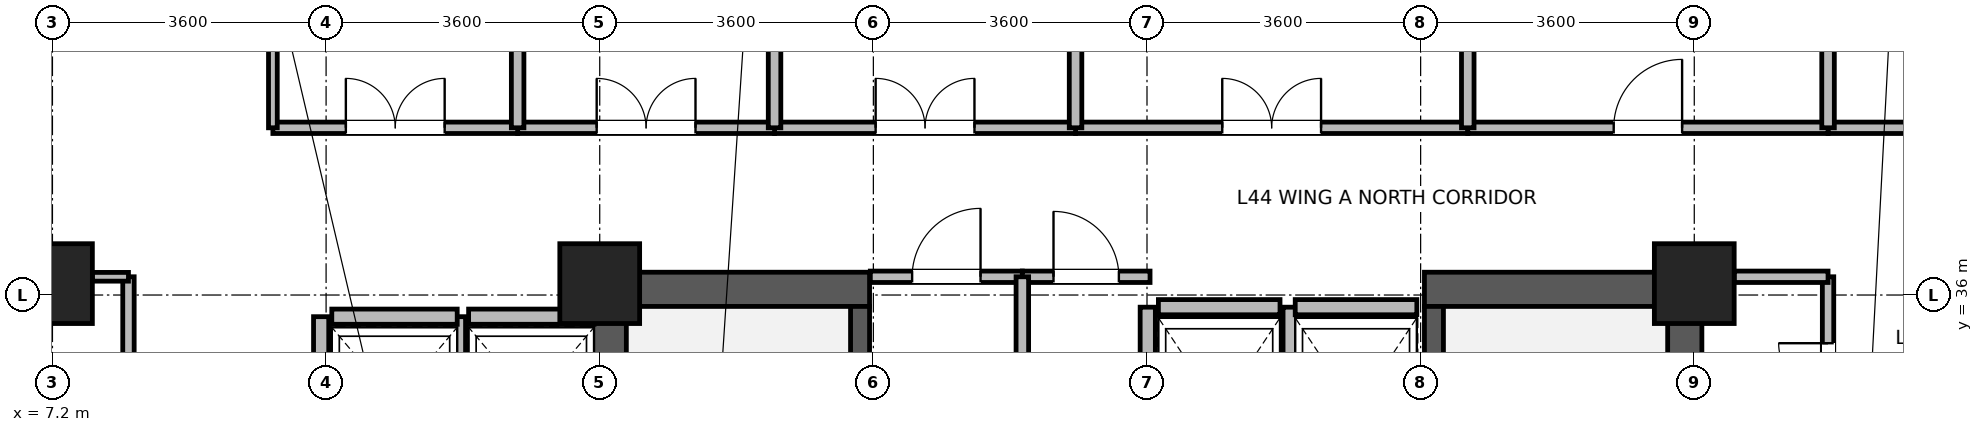
"""IFC4 building model, lengths in metres.
Left out: names, types, materials, properties, quantities, classifications, styles, units other than length and angle.
Written with IfcOpenShell. Run it as: python <this file> out.ifc"""

import sys

from ifc_helpers import new_model, si_unit, direction, frame, frame_2d, origin, origin_2d, place, context, subcontext, project, spatial, rectangle, extrude, source, transform, mapped, element, fill, save


model = new_model("IFC4")
c1 = context("Model", 3, precision=1e-05, world=origin(), true_north=direction((0.0, 1.0)))
c2 = subcontext(c1, "Body", "Model", "MODEL_VIEW")
j1 = project(units=[si_unit("LENGTHUNIT", "METRE"), si_unit("PLANEANGLEUNIT", "RADIAN")], contexts=[c1])
p1 = place(None, origin())
s1 = spatial("IfcSite", under=j1, at=p1, CompositionType="ELEMENT")
p2 = place(p1, origin())
s2 = spatial("IfcBuilding", under=s1, at=p2, CompositionType="ELEMENT")
p3 = place(p2, frame((0.0, 0.0, 173.5)))
s3 = spatial("IfcBuildingStorey", under=s2, at=p3, CompositionType="ELEMENT", Elevation=173.5)
for number, where, z_axis, x_axis in (
    (1, (14.525, 28.4, 0.0), (0.0, 0.0, 1.0), (0.0, 1.0, 0.0)),
    (2, (28.675, 28.4, 0.0), (0.0, 0.0, 1.0), (0.0, 1.0, 0.0)),
):
    element("IfcWall", number, at=place(p3, frame(where, z_axis=z_axis, x_axis=x_axis)), inside=s3, PredefinedType="SHEAR", context=c2, shape_type="SweptSolid", body=[
        extrude(rectangle(XDim=7.9, YDim=0.45, at=frame_2d((3.95, 0.0))), origin(), (0.0, 0.0, 1.0), 3.46),
    ])
for number, where, z_axis, x_axis in (
    (3, (14.75, 36.075, 0.0), (0.0, 0.0, 1.0), (1.0, 0.0, 0.0)),
    (4, (25.25, 36.075, 0.0), (0.0, 0.0, 1.0), (1.0, 0.0, 0.0)),
):
    element("IfcWall", number, at=place(p3, frame(where, z_axis=z_axis, x_axis=x_axis)), inside=s3, PredefinedType="SHEAR", context=c2, shape_type="SweptSolid", body=[
        extrude(rectangle(XDim=3.2, YDim=0.45, at=frame_2d((1.6, 0.0))), origin(), (0.0, 0.0, 1.0), 3.46),
    ])
p4 = place(p3, frame((17.825, 28.85, 0.0), z_axis=(0.0, 0.0, 1.0), x_axis=(0.0, 1.0, 0.0)))
e5 = element("IfcWall", 5, at=p4, inside=s3, PredefinedType="SHEAR", context=c2, shape_type="SweptSolid", body=[
    extrude(rectangle(XDim=7.0, YDim=0.25, at=frame_2d((3.5, 0.0))), origin(), (0.0, 0.0, 1.0), 3.46),
])
p5 = place(p4, frame((0.15, 0.0, 0.0)))
e6 = element("IfcOpeningElement", 6, at=p5, cuts=e5, PredefinedType="OPENING", context=c2, shape_type="SweptSolid", body=[
    extrude(rectangle(XDim=1.1, YDim=2.08, at=frame_2d((0.55, 1.04))), frame((0.0, 0.135, 0.0), z_axis=(0.0, -1.0, 0.0), x_axis=(1.0, 0.0, 0.0)), (0.0, 0.0, 1.0), 0.27),
])
p6 = place(p3, frame((25.375, 28.85, 0.0), z_axis=(0.0, 0.0, 1.0), x_axis=(0.0, 1.0, 0.0)))
e7 = element("IfcWall", 7, at=p6, inside=s3, PredefinedType="SHEAR", context=c2, shape_type="SweptSolid", body=[
    extrude(rectangle(XDim=7.0, YDim=0.25, at=frame_2d((3.5, 0.0))), origin(), (0.0, 0.0, 1.0), 3.46),
])
p7 = place(p6, frame((0.15, 0.0, 0.0)))
e8 = element("IfcOpeningElement", 8, at=p7, cuts=e7, PredefinedType="OPENING", context=c2, shape_type="SweptSolid", body=[
    extrude(rectangle(XDim=1.1, YDim=2.08, at=frame_2d((0.55, 1.04))), frame((0.0, 0.135, 0.0), z_axis=(0.0, -1.0, 0.0), x_axis=(1.0, 0.0, 0.0)), (0.0, 0.0, 1.0), 0.27),
])
m1 = source(origin(), c2, "Body", "SweptSolid", [
    extrude(rectangle(XDim=1.05, YDim=1.05, at=origin_2d()), origin(), (0.0, 0.0, 1.0), 3.7),
])
for number, where, z_axis, x_axis in (
    (9, (7.2, 36.15, 0.0), (0.0, 0.0, 1.0), (1.0, 0.0, 0.0)),
    (10, (14.4, 36.15, 0.0), (0.0, 0.0, 1.0), (1.0, 0.0, 0.0)),
    (11, (28.8, 36.15, 0.0), (0.0, 0.0, 1.0), (1.0, 0.0, 0.0)),
):
    element("IfcColumn", number, at=place(p3, frame(where, z_axis=z_axis, x_axis=x_axis)), inside=s3, PredefinedType="COLUMN", context=c2, shape_type="MappedRepresentation", body=[
        mapped(m1, transform((0.0, 0.0, 0.0), x_axis=(1.0, 0.0, 0.0), y_axis=(0.0, 1.0, 0.0), z_axis=(0.0, 0.0, 1.0), scale=1.0)),
    ])
p8 = place(p3, frame((12.675, 35.715, 0.0), z_axis=(0.0, 0.0, 1.0), x_axis=(1.0, 0.0, 0.0)))
e12 = element("IfcWall", 12, at=p8, inside=s3, PredefinedType="PARTITIONING", context=c2, shape_type="SweptSolid", body=[
    extrude(rectangle(XDim=1.65, YDim=0.2, at=frame_2d((0.825, 0.0))), origin(), (0.0, 0.0, 1.0), 3.44),
])
p9 = place(p3, frame((12.535, 33.485, 0.0), z_axis=(0.0, 0.0, 1.0), x_axis=(0.0, 1.0, 0.0)))
e13 = element("IfcWall", 13, at=p9, inside=s3, PredefinedType="PARTITIONING", context=c2, shape_type="SweptSolid", body=[
    extrude(rectangle(XDim=2.23, YDim=0.2, at=frame_2d((1.115, 0.0))), origin(), (0.0, 0.0, 1.0), 3.44),
])
p10 = place(p3, frame((10.875, 35.715, 0.0), z_axis=(0.0, 0.0, 1.0), x_axis=(1.0, 0.0, 0.0)))
e14 = element("IfcWall", 14, at=p10, inside=s3, PredefinedType="PARTITIONING", context=c2, shape_type="SweptSolid", body=[
    extrude(rectangle(XDim=1.65, YDim=0.2, at=frame_2d((0.825, 0.0))), origin(), (0.0, 0.0, 1.0), 3.44),
])
p11 = place(p3, frame((10.735, 33.485, 0.0), z_axis=(0.0, 0.0, 1.0), x_axis=(0.0, 1.0, 0.0)))
e15 = element("IfcWall", 15, at=p11, inside=s3, PredefinedType="PARTITIONING", context=c2, shape_type="SweptSolid", body=[
    extrude(rectangle(XDim=2.23, YDim=0.2, at=frame_2d((1.115, 0.0))), origin(), (0.0, 0.0, 1.0), 3.44),
])
p12 = place(p3, frame((21.75, 35.84, 0.0), z_axis=(0.0, 0.0, 1.0), x_axis=(1.0, 0.0, 0.0)))
e16 = element("IfcWall", 16, at=p12, inside=s3, PredefinedType="PARTITIONING", context=c2, shape_type="SweptSolid", body=[
    extrude(rectangle(XDim=1.6, YDim=0.2, at=frame_2d((0.8, 0.0))), origin(), (0.0, 0.0, 1.0), 2.44),
])
for number, where, z_axis, x_axis in (
    (17, (21.61, 33.16, 0.0), (0.0, 0.0, 1.0), (0.0, 1.0, 0.0)),
    (18, (23.49, 33.16, 0.0), (0.0, 0.0, 1.0), (0.0, 1.0, 0.0)),
):
    element("IfcWall", number, at=place(p3, frame(where, z_axis=z_axis, x_axis=x_axis)), inside=s3, PredefinedType="PARTITIONING", context=c2, shape_type="SweptSolid", body=[
        extrude(rectangle(XDim=2.68, YDim=0.2, at=frame_2d((1.34, 0.0))), origin(), (0.0, 0.0, 1.0), 3.44),
    ])
p13 = place(p3, frame((23.55, 35.84, 0.0), z_axis=(0.0, 0.0, 1.0), x_axis=(1.0, 0.0, 0.0)))
e19 = element("IfcWall", 19, at=p13, inside=s3, PredefinedType="PARTITIONING", context=c2, shape_type="SweptSolid", body=[
    extrude(rectangle(XDim=1.6, YDim=0.2, at=frame_2d((0.8, 0.0))), origin(), (0.0, 0.0, 1.0), 2.44),
])
p14 = place(p3, frame((20.66, 38.2, 0.0), z_axis=(0.0, 0.0, 1.0), x_axis=(1.0, 0.0, 0.0)))
e20 = element("IfcWall", 20, at=p14, inside=s3, PredefinedType="PARTITIONING", context=c2, shape_type="SweptSolid", body=[
    extrude(rectangle(XDim=5.16, YDim=0.15, at=frame_2d((2.58, 0.0))), origin(), (0.0, 0.0, 1.0), 3.44),
])
p15 = place(p14, frame((1.93, 0.0, 0.0)))
e21 = element("IfcOpeningElement", 21, at=p15, cuts=e20, PredefinedType="OPENING", context=c2, shape_type="SweptSolid", body=[
    extrude(rectangle(XDim=1.3, YDim=2.12, at=frame_2d((0.65, 1.06))), frame((0.0, 0.085, 0.0), z_axis=(0.0, -1.0, 0.0), x_axis=(1.0, 0.0, 0.0)), (0.0, 0.0, 1.0), 0.17),
])
p16 = place(p3, frame((30.56, 38.2, 0.0), z_axis=(0.0, 0.0, 1.0), x_axis=(1.0, 0.0, 0.0)))
e22 = element("IfcWall", 22, at=p16, inside=s3, PredefinedType="PARTITIONING", context=c2, shape_type="SweptSolid", body=[
    extrude(rectangle(XDim=4.8, YDim=0.15, at=frame_2d((2.4, 0.0))), origin(), (0.0, 0.0, 1.0), 3.44),
])
p17 = place(p16, frame((1.75, 0.0, 0.0)))
e23 = element("IfcOpeningElement", 23, at=p17, cuts=e22, PredefinedType="OPENING", context=c2, shape_type="SweptSolid", body=[
    extrude(rectangle(XDim=1.3, YDim=2.12, at=frame_2d((0.65, 1.06))), frame((0.0, 0.085, 0.0), z_axis=(0.0, -1.0, 0.0), x_axis=(1.0, 0.0, 0.0)), (0.0, 0.0, 1.0), 0.17),
])
p18 = place(p3, frame((25.82, 38.2, 0.0), z_axis=(0.0, 0.0, 1.0), x_axis=(1.0, 0.0, 0.0)))
e24 = element("IfcWall", 24, at=p18, inside=s3, PredefinedType="PARTITIONING", context=c2, shape_type="SweptSolid", body=[
    extrude(rectangle(XDim=4.74, YDim=0.15, at=frame_2d((2.37, 0.0))), origin(), (0.0, 0.0, 1.0), 3.44),
])
p19 = place(p18, frame((1.92, 0.0, 0.0)))
e25 = element("IfcOpeningElement", 25, at=p19, cuts=e24, PredefinedType="OPENING", context=c2, shape_type="SweptSolid", body=[
    extrude(rectangle(XDim=0.9, YDim=2.08, at=frame_2d((0.45, 1.04))), frame((0.0, 0.085, 0.0), z_axis=(0.0, -1.0, 0.0), x_axis=(1.0, 0.0, 0.0)), (0.0, 0.0, 1.0), 0.17),
])
p20 = place(p3, frame((16.7, 38.2, 0.0), z_axis=(0.0, 0.0, 1.0), x_axis=(1.0, 0.0, 0.0)))
e26 = element("IfcWall", 26, at=p20, inside=s3, PredefinedType="PARTITIONING", context=c2, shape_type="SweptSolid", body=[
    extrude(rectangle(XDim=3.96, YDim=0.15, at=frame_2d((1.98, 0.0))), origin(), (0.0, 0.0, 1.0), 3.44),
])
p21 = place(p20, frame((1.33, 0.0, 0.0)))
e27 = element("IfcOpeningElement", 27, at=p21, cuts=e26, PredefinedType="OPENING", context=c2, shape_type="SweptSolid", body=[
    extrude(rectangle(XDim=1.3, YDim=2.12, at=frame_2d((0.65, 1.06))), frame((0.0, 0.085, 0.0), z_axis=(0.0, -1.0, 0.0), x_axis=(1.0, 0.0, 0.0)), (0.0, 0.0, 1.0), 0.17),
])
p22 = place(p3, frame((8.2, 32.4, 0.0), z_axis=(0.0, 0.0, 1.0), x_axis=(0.0, 1.0, 0.0)))
e28 = element("IfcWall", 28, at=p22, inside=s3, PredefinedType="PARTITIONING", context=c2, shape_type="SweptSolid", body=[
    extrude(rectangle(XDim=3.84, YDim=0.15, at=frame_2d((1.92, 0.0))), origin(), (0.0, 0.0, 1.0), 3.44),
])
p23 = place(p22, frame((1.27, 0.0, 0.0)))
e29 = element("IfcOpeningElement", 29, at=p23, cuts=e28, PredefinedType="OPENING", context=c2, shape_type="SweptSolid", body=[
    extrude(rectangle(XDim=1.3, YDim=2.12, at=frame_2d((0.65, 1.06))), frame((0.0, 0.085, 0.0), z_axis=(0.0, -1.0, 0.0), x_axis=(1.0, 0.0, 0.0)), (0.0, 0.0, 1.0), 0.17),
])
p24 = place(p3, frame((13.32, 38.2, 0.0), z_axis=(0.0, 0.0, 1.0), x_axis=(1.0, 0.0, 0.0)))
e30 = element("IfcWall", 30, at=p24, inside=s3, PredefinedType="PARTITIONING", context=c2, shape_type="SweptSolid", body=[
    extrude(rectangle(XDim=3.38, YDim=0.15, at=frame_2d((1.69, 0.0))), origin(), (0.0, 0.0, 1.0), 3.44),
])
p25 = place(p24, frame((1.04, 0.0, 0.0)))
e31 = element("IfcOpeningElement", 31, at=p25, cuts=e30, PredefinedType="OPENING", context=c2, shape_type="SweptSolid", body=[
    extrude(rectangle(XDim=1.3, YDim=2.12, at=frame_2d((0.65, 1.06))), frame((0.0, 0.085, 0.0), z_axis=(0.0, -1.0, 0.0), x_axis=(1.0, 0.0, 0.0)), (0.0, 0.0, 1.0), 0.17),
])
p26 = place(p3, frame((10.1, 38.2, 0.0), z_axis=(0.0, 0.0, 1.0), x_axis=(1.0, 0.0, 0.0)))
e32 = element("IfcWall", 32, at=p26, inside=s3, PredefinedType="PARTITIONING", context=c2, shape_type="SweptSolid", body=[
    extrude(rectangle(XDim=3.22, YDim=0.15, at=frame_2d((1.61, 0.0))), origin(), (0.0, 0.0, 1.0), 3.44),
])
p27 = place(p26, frame((0.96, 0.0, 0.0)))
e33 = element("IfcOpeningElement", 33, at=p27, cuts=e32, PredefinedType="OPENING", context=c2, shape_type="SweptSolid", body=[
    extrude(rectangle(XDim=1.3, YDim=2.12, at=frame_2d((0.65, 1.06))), frame((0.0, 0.085, 0.0), z_axis=(0.0, -1.0, 0.0), x_axis=(1.0, 0.0, 0.0)), (0.0, 0.0, 1.0), 0.17),
])
p28 = place(p3, frame((30.56, 33.7, 0.0), z_axis=(0.0, 0.0, 1.0), x_axis=(0.0, 1.0, 0.0)))
e34 = element("IfcWall", 34, at=p28, inside=s3, PredefinedType="PARTITIONING", context=c2, shape_type="SweptSolid", body=[
    extrude(rectangle(XDim=2.54, YDim=0.15, at=frame_2d((1.27, 0.0))), origin(), (0.0, 0.0, 1.0), 3.44),
])
p29 = place(p28, frame((0.366, 0.0, 0.0)))
e35 = element("IfcOpeningElement", 35, at=p29, cuts=e34, PredefinedType="OPENING", context=c2, shape_type="SweptSolid", body=[
    extrude(rectangle(XDim=1.3, YDim=2.12, at=frame_2d((0.65, 1.06))), frame((0.0, 0.085, 0.0), z_axis=(0.0, -1.0, 0.0), x_axis=(1.0, 0.0, 0.0)), (0.0, 0.0, 1.0), 0.17),
])
p30 = place(p3, frame((17.96, 36.24, 0.0), z_axis=(0.0, 0.0, 1.0), x_axis=(1.0, 0.0, 0.0)))
e36 = element("IfcWall", 36, at=p30, inside=s3, PredefinedType="PARTITIONING", context=c2, shape_type="SweptSolid", body=[
    extrude(rectangle(XDim=2.0, YDim=0.15, at=frame_2d((1.0, 0.0))), origin(), (0.0, 0.0, 1.0), 2.44),
])
p31 = place(p30, frame((0.55, 0.0, 0.0)))
e37 = element("IfcOpeningElement", 37, at=p31, cuts=e36, PredefinedType="OPENING", context=c2, shape_type="SweptSolid", body=[
    extrude(rectangle(XDim=0.9, YDim=2.08, at=frame_2d((0.45, 1.04))), frame((0.0, 0.085, 0.0), z_axis=(0.0, -1.0, 0.0), x_axis=(1.0, 0.0, 0.0)), (0.0, 0.0, 1.0), 0.17),
])
p32 = place(p3, frame((29.325, 36.24, 0.0), z_axis=(0.0, 0.0, 1.0), x_axis=(1.0, 0.0, 0.0)))
e38 = element("IfcWall", 38, at=p32, inside=s3, PredefinedType="PARTITIONING", context=c2, shape_type="SweptSolid", body=[
    extrude(rectangle(XDim=1.235, YDim=0.15, at=frame_2d((0.618, 0.0))), origin(), (0.0, 0.0, 1.0), 2.84),
])
p33 = place(p3, frame((19.96, 36.24, 0.0), z_axis=(0.0, 0.0, 1.0), x_axis=(1.0, 0.0, 0.0)))
e39 = element("IfcWall", 39, at=p33, inside=s3, PredefinedType="PARTITIONING", context=c2, shape_type="SweptSolid", body=[
    extrude(rectangle(XDim=1.68, YDim=0.15, at=frame_2d((0.84, 0.0))), origin(), (0.0, 0.0, 1.0), 2.44),
])
p34 = place(p33, frame((0.41, 0.0, 0.0)))
e40 = element("IfcOpeningElement", 40, at=p34, cuts=e39, PredefinedType="OPENING", context=c2, shape_type="SweptSolid", body=[
    extrude(rectangle(XDim=0.86, YDim=2.02, at=frame_2d((0.43, 1.01))), frame((0.0, 0.085, 0.0), z_axis=(0.0, -1.0, 0.0), x_axis=(1.0, 0.0, 0.0)), (0.0, 0.0, 1.0), 0.17),
])
p35 = place(p3, frame((7.725, 36.24, 0.0), z_axis=(0.0, 0.0, 1.0), x_axis=(1.0, 0.0, 0.0)))
e41 = element("IfcWall", 41, at=p35, inside=s3, PredefinedType="PARTITIONING", context=c2, shape_type="SweptSolid", body=[
    extrude(rectangle(XDim=0.475, YDim=0.115, at=frame_2d((0.237, 0.0))), origin(), (0.0, 0.0, 1.0), 2.84),
])
p36 = place(p3, frame((10.1, 38.2, 0.0), z_axis=(0.0, 0.0, 1.0), x_axis=(0.0, 1.0, 0.0)))
e42 = element("IfcWall", 42, at=p36, inside=s3, PredefinedType="PARTITIONING", context=c2, shape_type="SweptSolid", body=[
    extrude(rectangle(XDim=1.268, YDim=0.115, at=frame_2d((0.634, 0.0))), origin(), (0.0, 0.0, 1.0), 3.44),
])
for number, where, z_axis, x_axis in (
    (43, (13.32, 38.2, 0.0), (0.0, 0.0, 1.0), (0.0, 1.0, 0.0)),
    (44, (16.7, 38.2, 0.0), (0.0, 0.0, 1.0), (0.0, 1.0, 0.0)),
    (45, (20.66, 38.2, 0.0), (0.0, 0.0, 1.0), (0.0, 1.0, 0.0)),
    (46, (25.82, 38.2, 0.0), (0.0, 0.0, 1.0), (0.0, 1.0, 0.0)),
    (47, (30.56, 38.2, 0.0), (0.0, 0.0, 1.0), (0.0, 1.0, 0.0)),
):
    element("IfcWall", number, at=place(p3, frame(where, z_axis=z_axis, x_axis=x_axis)), inside=s3, PredefinedType="PARTITIONING", context=c2, shape_type="SweptSolid", body=[
        extrude(rectangle(XDim=4.868, YDim=0.165, at=frame_2d((2.434, 0.0))), origin(), (0.0, 0.0, 1.0), 3.44),
    ])
p37 = place(p3, frame((19.96, 33.36, 0.0), z_axis=(0.0, 0.0, 1.0), x_axis=(0.0, 1.0, 0.0)))
e48 = element("IfcWall", 48, at=p37, inside=s3, PredefinedType="PARTITIONING", context=c2, shape_type="SweptSolid", body=[
    extrude(rectangle(XDim=2.88, YDim=0.165, at=frame_2d((1.44, 0.0))), origin(), (0.0, 0.0, 1.0), 3.44),
])
p38 = place(p15, origin())
e49 = element("IfcDoor", 49, at=p38, inside=s3, OperationType="DOUBLE_DOOR_SINGLE_SWING", PredefinedType="DOOR", context=c2, shape_type="SweptSolid", body=[
    extrude(rectangle(XDim=1.3, YDim=2.12, at=frame_2d((0.65, 1.06))), frame((0.0, 0.025, 0.0), z_axis=(0.0, -1.0, 0.0), x_axis=(1.0, 0.0, 0.0)), (0.0, 0.0, 1.0), 0.05),
])
fill(e21, e49)
p39 = place(p19, origin())
e50 = element("IfcDoor", 50, at=p39, inside=s3, OperationType="SINGLE_SWING_RIGHT", PredefinedType="DOOR", context=c2, shape_type="SweptSolid", body=[
    extrude(rectangle(XDim=0.9, YDim=2.08, at=frame_2d((0.45, 1.04))), frame((0.0, 0.025, 0.0), z_axis=(0.0, -1.0, 0.0), x_axis=(1.0, 0.0, 0.0)), (0.0, 0.0, 1.0), 0.05),
])
fill(e25, e50)
p40 = place(p21, origin())
e51 = element("IfcDoor", 51, at=p40, inside=s3, OperationType="DOUBLE_DOOR_SINGLE_SWING", PredefinedType="DOOR", context=c2, shape_type="SweptSolid", body=[
    extrude(rectangle(XDim=1.3, YDim=2.12, at=frame_2d((0.65, 1.06))), frame((0.0, 0.025, 0.0), z_axis=(0.0, -1.0, 0.0), x_axis=(1.0, 0.0, 0.0)), (0.0, 0.0, 1.0), 0.05),
])
fill(e27, e51)
p41 = place(p25, origin())
e52 = element("IfcDoor", 52, at=p41, inside=s3, OperationType="DOUBLE_DOOR_SINGLE_SWING", PredefinedType="DOOR", context=c2, shape_type="SweptSolid", body=[
    extrude(rectangle(XDim=1.3, YDim=2.12, at=frame_2d((0.65, 1.06))), frame((0.0, 0.025, 0.0), z_axis=(0.0, -1.0, 0.0), x_axis=(1.0, 0.0, 0.0)), (0.0, 0.0, 1.0), 0.05),
])
fill(e31, e52)
p42 = place(p27, origin())
e53 = element("IfcDoor", 53, at=p42, inside=s3, OperationType="DOUBLE_DOOR_SINGLE_SWING", PredefinedType="DOOR", context=c2, shape_type="SweptSolid", body=[
    extrude(rectangle(XDim=1.3, YDim=2.12, at=frame_2d((0.65, 1.06))), frame((0.0, 0.025, 0.0), z_axis=(0.0, -1.0, 0.0), x_axis=(1.0, 0.0, 0.0)), (0.0, 0.0, 1.0), 0.05),
])
fill(e33, e53)
p43 = place(p29, origin())
e54 = element("IfcDoor", 54, at=p43, inside=s3, OperationType="DOUBLE_DOOR_SINGLE_SWING", PredefinedType="DOOR", context=c2, shape_type="SweptSolid", body=[
    extrude(rectangle(XDim=1.3, YDim=2.12, at=frame_2d((0.65, 1.06))), frame((0.0, 0.025, 0.0), z_axis=(0.0, -1.0, 0.0), x_axis=(1.0, 0.0, 0.0)), (0.0, 0.0, 1.0), 0.05),
])
fill(e35, e54)
p44 = place(p31, origin())
e55 = element("IfcDoor", 55, at=p44, inside=s3, OperationType="SINGLE_SWING_RIGHT", PredefinedType="DOOR", context=c2, shape_type="SweptSolid", body=[
    extrude(rectangle(XDim=0.9, YDim=2.08, at=frame_2d((0.45, 1.04))), frame((0.0, 0.025, 0.0), z_axis=(0.0, -1.0, 0.0), x_axis=(1.0, 0.0, 0.0)), (0.0, 0.0, 1.0), 0.05),
])
fill(e37, e55)
p45 = place(p34, origin())
e56 = element("IfcDoor", 56, at=p45, inside=s3, OperationType="SINGLE_SWING_LEFT", PredefinedType="DOOR", context=c2, shape_type="SweptSolid", body=[
    extrude(rectangle(XDim=0.86, YDim=2.02, at=frame_2d((0.43, 1.01))), frame((0.0, 0.025, 0.0), z_axis=(0.0, -1.0, 0.0), x_axis=(1.0, 0.0, 0.0)), (0.0, 0.0, 1.0), 0.05),
])
fill(e40, e56)
save(model, sys.argv[1])
